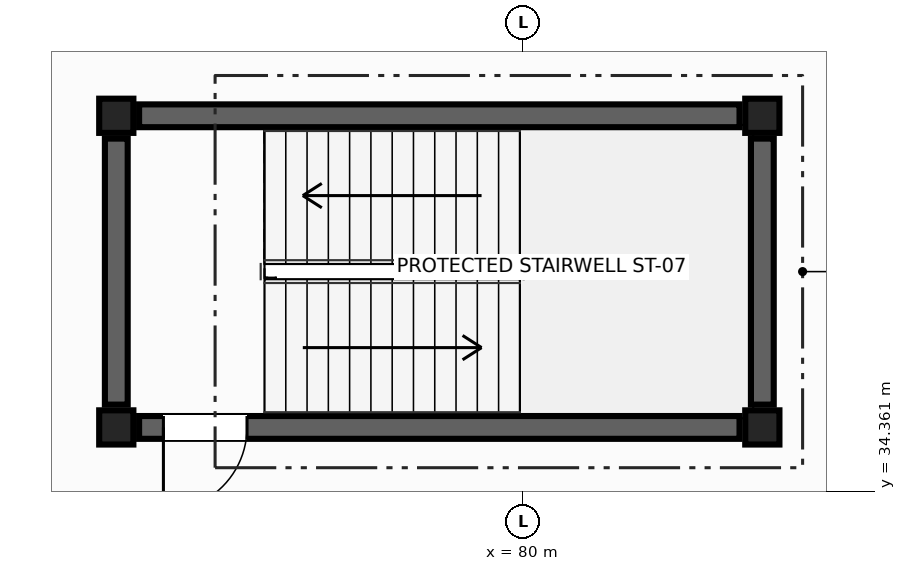
"""IFC4 building model, lengths in metres.
Left out: names, types, materials, properties, quantities, classifications, styles, units other than length and angle.
Written with IfcOpenShell. Run it as: python <this file> out.ifc"""

import sys

from ifc_helpers import new_model, si_unit, direction, frame, frame_2d, origin, origin_2d, place, context, subcontext, project, spatial, rectangle, extrude, element, fill, save


model = new_model("IFC4")
c1 = context("Model", 3, precision=1e-05, world=origin(), true_north=direction((0.0, 1.0)))
c2 = subcontext(c1, "Body", "Model", "MODEL_VIEW")
j1 = project(units=[si_unit("LENGTHUNIT", "METRE"), si_unit("PLANEANGLEUNIT", "RADIAN")], contexts=[c1])
p1 = place(None, origin())
s1 = spatial("IfcSite", under=j1, at=p1, CompositionType="ELEMENT")
p2 = place(p1, origin())
s2 = spatial("IfcBuilding", under=s1, at=p2, CompositionType="ELEMENT")
p3 = place(p2, frame((0.0, 0.0, 9.9)))
s3 = spatial("IfcBuildingStorey", under=s2, at=p3, CompositionType="ELEMENT", Elevation=9.9)
for number, where, z_axis, x_axis in (
    (1, (74.65, 35.2, 0.0), (0.0, 0.0, 1.0), (1.0, 0.0, 0.0)),
    (2, (83.15, 35.2, 0.0), (0.0, 0.0, 1.0), (1.0, 0.0, 0.0)),
    (3, (83.15, 39.3, 0.0), (0.0, 0.0, 1.0), (1.0, 0.0, 0.0)),
    (4, (74.65, 39.3, 0.0), (0.0, 0.0, 1.0), (1.0, 0.0, 0.0)),
):
    element("IfcColumn", number, at=place(p3, frame(where, z_axis=z_axis, x_axis=x_axis)), inside=s3, PredefinedType="COLUMN", context=c2, shape_type="SweptSolid", body=[
        extrude(rectangle(XDim=0.45, YDim=0.45, at=origin_2d()), origin(), (0.0, 0.0, 1.0), 4.5),
    ])
p4 = place(p3, frame((82.85, 35.2, 0.0), z_axis=(0.0, 0.0, 1.0), x_axis=(-1.0, 0.0, 0.0)))
e5 = element("IfcWall", 5, at=p4, inside=s3, PredefinedType="SHEAR", context=c2, shape_type="SweptSolid", body=[
    extrude(rectangle(XDim=7.9, YDim=0.3, at=frame_2d((3.95, 0.0))), origin(), (0.0, 0.0, 1.0), 4.22),
])
p5 = place(p4, frame((6.48, 0.0, 0.0)))
e6 = element("IfcOpeningElement", 6, at=p5, cuts=e5, PredefinedType="OPENING", context=c2, shape_type="SweptSolid", body=[
    extrude(rectangle(XDim=1.1, YDim=2.15, at=frame_2d((0.55, 1.075))), frame((0.0, 0.16, 0.0), z_axis=(0.0, -1.0, 0.0), x_axis=(1.0, 0.0, 0.0)), (0.0, 0.0, 1.0), 0.32),
])
p6 = place(p3, frame((74.65, 35.5, 0.0), z_axis=(0.0, 0.0, 1.0), x_axis=(0.0, 1.0, 0.0)))
e7 = element("IfcWall", 7, at=p6, inside=s3, PredefinedType="SHEAR", context=c2, shape_type="SweptSolid", body=[
    extrude(rectangle(XDim=3.5, YDim=0.3, at=frame_2d((1.75, 0.0))), origin(), (0.0, 0.0, 1.0), 4.22),
])
p7 = place(p3, frame((74.95, 39.3, 0.0), z_axis=(0.0, 0.0, 1.0), x_axis=(1.0, 0.0, 0.0)))
e8 = element("IfcWall", 8, at=p7, inside=s3, PredefinedType="SHEAR", context=c2, shape_type="SweptSolid", body=[
    extrude(rectangle(XDim=7.9, YDim=0.3, at=frame_2d((3.95, 0.0))), origin(), (0.0, 0.0, 1.0), 4.22),
])
p8 = place(p3, frame((83.15, 39.0, 0.0), z_axis=(0.0, 0.0, 1.0), x_axis=(0.0, -1.0, 0.0)))
e9 = element("IfcWall", 9, at=p8, inside=s3, PredefinedType="SHEAR", context=c2, shape_type="SweptSolid", body=[
    extrude(rectangle(XDim=3.5, YDim=0.3, at=frame_2d((1.75, 0.0))), origin(), (0.0, 0.0, 1.0), 4.22),
])
p9 = place(p5, origin())
e10 = element("IfcDoor", 10, at=p9, inside=s3, OperationType="SINGLE_SWING_RIGHT", PredefinedType="DOOR", context=c2, shape_type="SweptSolid", body=[
    extrude(rectangle(XDim=1.1, YDim=2.15, at=frame_2d((0.55, 1.075))), frame((0.0, 0.025, 0.0), z_axis=(0.0, -1.0, 0.0), x_axis=(1.0, 0.0, 0.0)), (0.0, 0.0, 1.0), 0.05),
])
fill(e6, e10)
save(model, sys.argv[1])
